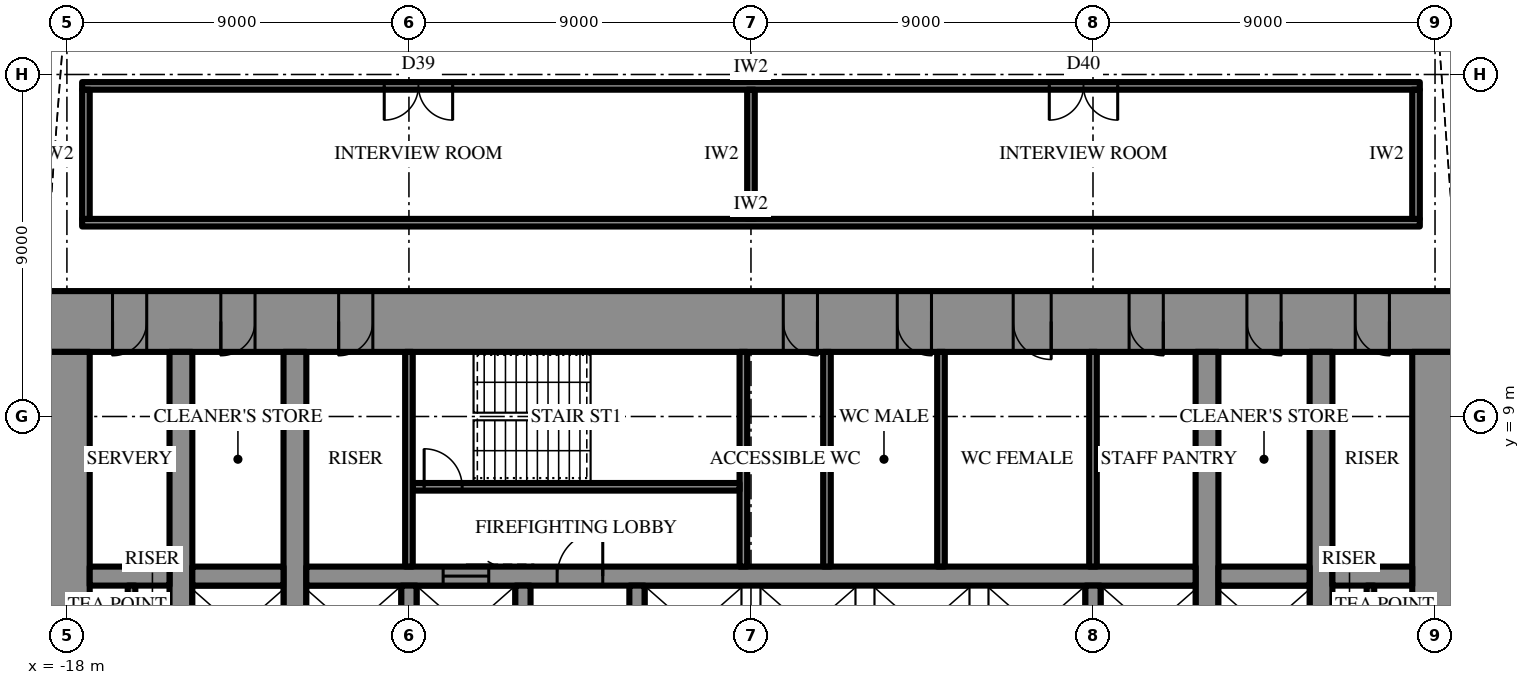
"""IFC4 building model, lengths in metres.
Left out: names, types, materials, properties, quantities, classifications, styles, units other than length and angle.
Written with IfcOpenShell. Run it as: python <this file> out.ifc"""

import sys

from ifc_helpers import new_model, si_unit, direction, frame, frame_2d, origin, place, context, subcontext, project, spatial, rectangle, extrude, element, fill, save


model = new_model("IFC4")
c1 = context("Model", 3, precision=1e-05, world=origin(), true_north=direction((0.0, 1.0)))
c2 = subcontext(c1, "Body", "Model", "MODEL_VIEW")
j1 = project(units=[si_unit("LENGTHUNIT", "METRE"), si_unit("PLANEANGLEUNIT", "RADIAN")], contexts=[c1])
p1 = place(None, origin())
s1 = spatial("IfcSite", under=j1, at=p1, CompositionType="ELEMENT")
p2 = place(p1, origin())
s2 = spatial("IfcBuilding", under=s1, at=p2, CompositionType="ELEMENT")
p3 = place(p2, frame((0.0, 0.0, 165.7)))
s3 = spatial("IfcBuildingStorey", under=s2, at=p3, CompositionType="ELEMENT", Elevation=165.7)
p4 = place(p3, frame((-18.6, 11.5, 0.0), z_axis=(0.0, 0.0, 1.0), x_axis=(1.0, 0.0, 0.0)))
e1 = element("IfcWall", 1, at=p4, inside=s3, PredefinedType="SHEAR", context=c2, shape_type="SweptSolid", body=[
    extrude(rectangle(XDim=37.2, YDim=1.6, at=frame_2d((18.6, 0.0))), origin(), (0.0, 0.0, 1.0), 4.2),
])
p5 = place(p4, frame((19.45, 0.0, 0.0)))
e2 = element("IfcOpeningElement", 2, at=p5, cuts=e1, PredefinedType="OPENING", context=c2, shape_type="SweptSolid", body=[
    extrude(rectangle(XDim=0.9, YDim=2.2, at=frame_2d((0.45, 1.1))), frame((0.0, 0.81, 0.0), z_axis=(0.0, -1.0, 0.0), x_axis=(1.0, 0.0, 0.0)), (0.0, 0.0, 1.0), 1.62),
])
p6 = place(p4, frame((22.45, 0.0, 0.0)))
e3 = element("IfcOpeningElement", 3, at=p6, cuts=e1, PredefinedType="OPENING", context=c2, shape_type="SweptSolid", body=[
    extrude(rectangle(XDim=0.9, YDim=2.2, at=frame_2d((0.45, 1.1))), frame((0.0, 0.81, 0.0), z_axis=(0.0, -1.0, 0.0), x_axis=(1.0, 0.0, 0.0)), (0.0, 0.0, 1.0), 1.62),
])
p7 = place(p4, frame((25.5, 0.0, 0.0)))
e4 = element("IfcOpeningElement", 4, at=p7, cuts=e1, PredefinedType="OPENING", context=c2, shape_type="SweptSolid", body=[
    extrude(rectangle(XDim=1.0, YDim=2.2, at=frame_2d((0.5, 1.1))), frame((0.0, 0.81, 0.0), z_axis=(0.0, -1.0, 0.0), x_axis=(1.0, 0.0, 0.0)), (0.0, 0.0, 1.0), 1.62),
])
p8 = place(p4, frame((1.8, 0.0, 0.0)))
e5 = element("IfcOpeningElement", 5, at=p8, cuts=e1, PredefinedType="OPENING", context=c2, shape_type="SweptSolid", body=[
    extrude(rectangle(XDim=0.9, YDim=2.2, at=frame_2d((0.45, 1.1))), frame((0.0, 0.81, 0.0), z_axis=(0.0, -1.0, 0.0), x_axis=(1.0, 0.0, 0.0)), (0.0, 0.0, 1.0), 1.62),
])
p9 = place(p4, frame((4.65, 0.0, 0.0)))
e6 = element("IfcOpeningElement", 6, at=p9, cuts=e1, PredefinedType="OPENING", context=c2, shape_type="SweptSolid", body=[
    extrude(rectangle(XDim=0.9, YDim=2.2, at=frame_2d((0.45, 1.1))), frame((0.0, 0.81, 0.0), z_axis=(0.0, -1.0, 0.0), x_axis=(1.0, 0.0, 0.0)), (0.0, 0.0, 1.0), 1.62),
])
p10 = place(p4, frame((7.75, 0.0, 0.0)))
e7 = element("IfcOpeningElement", 7, at=p10, cuts=e1, PredefinedType="OPENING", context=c2, shape_type="SweptSolid", body=[
    extrude(rectangle(XDim=0.9, YDim=2.2, at=frame_2d((0.45, 1.1))), frame((0.0, 0.81, 0.0), z_axis=(0.0, -1.0, 0.0), x_axis=(1.0, 0.0, 0.0)), (0.0, 0.0, 1.0), 1.62),
])
p11 = place(p4, frame((28.55, 0.0, 0.0)))
e8 = element("IfcOpeningElement", 8, at=p11, cuts=e1, PredefinedType="OPENING", context=c2, shape_type="SweptSolid", body=[
    extrude(rectangle(XDim=0.9, YDim=2.2, at=frame_2d((0.45, 1.1))), frame((0.0, 0.81, 0.0), z_axis=(0.0, -1.0, 0.0), x_axis=(1.0, 0.0, 0.0)), (0.0, 0.0, 1.0), 1.62),
])
p12 = place(p4, frame((31.65, 0.0, 0.0)))
e9 = element("IfcOpeningElement", 9, at=p12, cuts=e1, PredefinedType="OPENING", context=c2, shape_type="SweptSolid", body=[
    extrude(rectangle(XDim=0.9, YDim=2.2, at=frame_2d((0.45, 1.1))), frame((0.0, 0.81, 0.0), z_axis=(0.0, -1.0, 0.0), x_axis=(1.0, 0.0, 0.0)), (0.0, 0.0, 1.0), 1.62),
])
p13 = place(p4, frame((34.5, 0.0, 0.0)))
e10 = element("IfcOpeningElement", 10, at=p13, cuts=e1, PredefinedType="OPENING", context=c2, shape_type="SweptSolid", body=[
    extrude(rectangle(XDim=0.9, YDim=2.2, at=frame_2d((0.45, 1.1))), frame((0.0, 0.81, 0.0), z_axis=(0.0, -1.0, 0.0), x_axis=(1.0, 0.0, 0.0)), (0.0, 0.0, 1.0), 1.62),
])
p14 = place(p3, frame((18.0, -10.7, 0.0), z_axis=(0.0, 0.0, 1.0), x_axis=(0.0, 1.0, 0.0)))
e11 = element("IfcWall", 11, at=p14, inside=s3, PredefinedType="SHEAR", context=c2, shape_type="SweptSolid", body=[
    extrude(rectangle(XDim=21.4, YDim=1.2, at=frame_2d((10.7, 0.0))), origin(), (0.0, 0.0, 1.0), 4.2),
])
p15 = place(p14, frame((9.8, 0.0, 0.0)))
e12 = element("IfcOpeningElement", 12, at=p15, cuts=e11, PredefinedType="OPENING", context=c2, shape_type="SweptSolid", body=[
    extrude(rectangle(XDim=1.8, YDim=2.4, at=frame_2d((0.9, 1.2))), frame((0.0, 0.61, 0.0), z_axis=(0.0, -1.0, 0.0), x_axis=(1.0, 0.0, 0.0)), (0.0, 0.0, 1.0), 1.22),
])
p16 = place(p3, frame((-18.0, 10.7, 0.0), z_axis=(0.0, 0.0, 1.0), x_axis=(0.0, -1.0, 0.0)))
e13 = element("IfcWall", 13, at=p16, inside=s3, PredefinedType="SHEAR", context=c2, shape_type="SweptSolid", body=[
    extrude(rectangle(XDim=21.4, YDim=1.2, at=frame_2d((10.7, 0.0))), origin(), (0.0, 0.0, 1.0), 4.2),
])
p17 = place(p16, frame((9.8, 0.0, 0.0)))
e14 = element("IfcOpeningElement", 14, at=p17, cuts=e13, PredefinedType="OPENING", context=c2, shape_type="SweptSolid", body=[
    extrude(rectangle(XDim=1.8, YDim=2.4, at=frame_2d((0.9, 1.2))), frame((0.0, 0.61, 0.0), z_axis=(0.0, -1.0, 0.0), x_axis=(1.0, 0.0, 0.0)), (0.0, 0.0, 1.0), 1.22),
])
p18 = place(p3, frame((12.0, -10.7, 0.0), z_axis=(0.0, 0.0, 1.0), x_axis=(0.0, 1.0, 0.0)))
e15 = element("IfcWall", 15, at=p18, inside=s3, PredefinedType="SHEAR", context=c2, shape_type="SweptSolid", body=[
    extrude(rectangle(XDim=21.4, YDim=0.6, at=frame_2d((10.7, 0.0))), origin(), (0.0, 0.0, 1.0), 4.2),
])
p19 = place(p18, frame((9.8, 0.0, 0.0)))
e16 = element("IfcOpeningElement", 16, at=p19, cuts=e15, PredefinedType="OPENING", context=c2, shape_type="SweptSolid", body=[
    extrude(rectangle(XDim=1.8, YDim=2.4, at=frame_2d((0.9, 1.2))), frame((0.0, 0.31, 0.0), z_axis=(0.0, -1.0, 0.0), x_axis=(1.0, 0.0, 0.0)), (0.0, 0.0, 1.0), 0.62),
])
p20 = place(p3, frame((-12.0, -10.7, 0.0), z_axis=(0.0, 0.0, 1.0), x_axis=(0.0, 1.0, 0.0)))
e17 = element("IfcWall", 17, at=p20, inside=s3, PredefinedType="SHEAR", context=c2, shape_type="SweptSolid", body=[
    extrude(rectangle(XDim=21.4, YDim=0.6, at=frame_2d((10.7, 0.0))), origin(), (0.0, 0.0, 1.0), 4.2),
])
p21 = place(p20, frame((9.8, 0.0, 0.0)))
e18 = element("IfcOpeningElement", 18, at=p21, cuts=e17, PredefinedType="OPENING", context=c2, shape_type="SweptSolid", body=[
    extrude(rectangle(XDim=1.8, YDim=2.4, at=frame_2d((0.9, 1.2))), frame((0.0, 0.31, 0.0), z_axis=(0.0, -1.0, 0.0), x_axis=(1.0, 0.0, 0.0)), (0.0, 0.0, 1.0), 0.62),
])
p22 = place(p3, frame((15.0, -10.7, 0.0), z_axis=(0.0, 0.0, 1.0), x_axis=(0.0, 1.0, 0.0)))
e19 = element("IfcWall", 19, at=p22, inside=s3, PredefinedType="SHEAR", context=c2, shape_type="SweptSolid", body=[
    extrude(rectangle(XDim=21.4, YDim=0.6, at=frame_2d((10.7, 0.0))), origin(), (0.0, 0.0, 1.0), 4.2),
])
p23 = place(p22, frame((9.8, 0.0, 0.0)))
e20 = element("IfcOpeningElement", 20, at=p23, cuts=e19, PredefinedType="OPENING", context=c2, shape_type="SweptSolid", body=[
    extrude(rectangle(XDim=1.8, YDim=2.4, at=frame_2d((0.9, 1.2))), frame((0.0, 0.31, 0.0), z_axis=(0.0, -1.0, 0.0), x_axis=(1.0, 0.0, 0.0)), (0.0, 0.0, 1.0), 0.62),
])
p24 = place(p3, frame((-15.0, -10.7, 0.0), z_axis=(0.0, 0.0, 1.0), x_axis=(0.0, 1.0, 0.0)))
e21 = element("IfcWall", 21, at=p24, inside=s3, PredefinedType="SHEAR", context=c2, shape_type="SweptSolid", body=[
    extrude(rectangle(XDim=21.4, YDim=0.6, at=frame_2d((10.7, 0.0))), origin(), (0.0, 0.0, 1.0), 4.2),
])
p25 = place(p24, frame((9.8, 0.0, 0.0)))
e22 = element("IfcOpeningElement", 22, at=p25, cuts=e21, PredefinedType="OPENING", context=c2, shape_type="SweptSolid", body=[
    extrude(rectangle(XDim=1.8, YDim=2.4, at=frame_2d((0.9, 1.2))), frame((0.0, 0.31, 0.0), z_axis=(0.0, -1.0, 0.0), x_axis=(1.0, 0.0, 0.0)), (0.0, 0.0, 1.0), 0.62),
])
p26 = place(p3, frame((-17.4, 4.8, 0.0), z_axis=(0.0, 0.0, 1.0), x_axis=(1.0, 0.0, 0.0)))
e23 = element("IfcWall", 23, at=p26, inside=s3, PredefinedType="SHEAR", context=c2, shape_type="SweptSolid", body=[
    extrude(rectangle(XDim=2.1, YDim=0.5, at=frame_2d((1.05, 0.0))), origin(), (0.0, 0.0, 1.0), 4.2),
])
p27 = place(p3, frame((-14.7, 4.8, 0.0), z_axis=(0.0, 0.0, 1.0), x_axis=(1.0, 0.0, 0.0)))
e24 = element("IfcWall", 24, at=p27, inside=s3, PredefinedType="SHEAR", context=c2, shape_type="SweptSolid", body=[
    extrude(rectangle(XDim=2.4, YDim=0.5, at=frame_2d((1.2, 0.0))), origin(), (0.0, 0.0, 1.0), 4.2),
])
p28 = place(p3, frame((-11.7, 4.8, 0.0), z_axis=(0.0, 0.0, 1.0), x_axis=(1.0, 0.0, 0.0)))
e25 = element("IfcWall", 25, at=p28, inside=s3, PredefinedType="SHEAR", context=c2, shape_type="SweptSolid", body=[
    extrude(rectangle(XDim=23.4, YDim=0.5, at=frame_2d((11.7, 0.0))), origin(), (0.0, 0.0, 1.0), 4.2),
])
p29 = place(p28, frame((6.6, 0.0, 0.0)))
e26 = element("IfcOpeningElement", 26, at=p29, cuts=e25, PredefinedType="OPENING", context=c2, shape_type="SweptSolid", body=[
    extrude(rectangle(XDim=1.2, YDim=2.2, at=frame_2d((0.6, 1.1))), frame((0.0, 0.26, 0.0), z_axis=(0.0, -1.0, 0.0), x_axis=(1.0, 0.0, 0.0)), (0.0, 0.0, 1.0), 0.52),
])
p30 = place(p28, frame((3.6, 0.0, 0.0)))
e27 = element("IfcOpeningElement", 27, at=p30, cuts=e25, PredefinedType="OPENING", context=c2, shape_type="SweptSolid", body=[
    extrude(rectangle(XDim=1.2, YDim=2.2, at=frame_2d((0.6, 1.1))), frame((0.0, 0.26, 0.0), z_axis=(0.0, -1.0, 0.0), x_axis=(1.0, 0.0, 0.0)), (0.0, 0.0, 1.0), 0.52),
])
p31 = place(p3, frame((12.3, 4.8, 0.0), z_axis=(0.0, 0.0, 1.0), x_axis=(1.0, 0.0, 0.0)))
e28 = element("IfcWall", 28, at=p31, inside=s3, PredefinedType="SHEAR", context=c2, shape_type="SweptSolid", body=[
    extrude(rectangle(XDim=2.4, YDim=0.5, at=frame_2d((1.2, 0.0))), origin(), (0.0, 0.0, 1.0), 4.2),
])
p32 = place(p3, frame((15.3, 4.8, 0.0), z_axis=(0.0, 0.0, 1.0), x_axis=(1.0, 0.0, 0.0)))
e29 = element("IfcWall", 29, at=p32, inside=s3, PredefinedType="SHEAR", context=c2, shape_type="SweptSolid", body=[
    extrude(rectangle(XDim=2.1, YDim=0.5, at=frame_2d((1.05, 0.0))), origin(), (0.0, 0.0, 1.0), 4.2),
])
for number, where, z_axis, x_axis in (
    (30, (-9.0, 2.25, 0.0), (0.0, 0.0, 1.0), (0.0, 1.0, 0.0)),
    (31, (-6.0, 2.25, 0.0), (0.0, 0.0, 1.0), (0.0, 1.0, 0.0)),
    (32, (-3.0, 2.25, 0.0), (0.0, 0.0, 1.0), (0.0, 1.0, 0.0)),
    (33, (9.0, 2.25, 0.0), (0.0, 0.0, 1.0), (0.0, 1.0, 0.0)),
):
    element("IfcWall", number, at=place(p3, frame(where, z_axis=z_axis, x_axis=x_axis)), inside=s3, PredefinedType="SHEAR", context=c2, shape_type="SweptSolid", body=[
        extrude(rectangle(XDim=2.3, YDim=0.4, at=frame_2d((1.15, 0.0))), origin(), (0.0, 0.0, 1.0), 4.2),
    ])
p33 = place(p3, frame((-0.2, 5.05, 0.0), z_axis=(0.0, 0.0, 1.0), x_axis=(0.0, 1.0, 0.0)))
e34 = element("IfcWall", 34, at=p33, inside=s3, PredefinedType="SHEAR", context=c2, shape_type="SweptSolid", body=[
    extrude(rectangle(XDim=5.65, YDim=0.2, at=frame_2d((2.825, 0.0))), origin(), (0.0, 0.0, 1.0), 4.2),
])
p34 = place(p3, frame((-8.9, 7.15, 0.0), z_axis=(0.0, 0.0, 1.0), x_axis=(1.0, 0.0, 0.0)))
e35 = element("IfcWall", 35, at=p34, inside=s3, PredefinedType="SHEAR", context=c2, shape_type="SweptSolid", body=[
    extrude(rectangle(XDim=8.6, YDim=0.2, at=frame_2d((4.3, 0.0))), origin(), (0.0, 0.0, 1.0), 4.2),
])
p35 = place(p34, frame((0.3, 0.0, 0.0)))
e36 = element("IfcOpeningElement", 36, at=p35, cuts=e35, PredefinedType="OPENING", context=c2, shape_type="SweptSolid", body=[
    extrude(rectangle(XDim=1.0, YDim=2.2, at=frame_2d((0.5, 1.1))), frame((0.0, 0.11, 0.0), z_axis=(0.0, -1.0, 0.0), x_axis=(1.0, 0.0, 0.0)), (0.0, 0.0, 1.0), 0.22),
])
for number, where, z_axis, x_axis in (
    (37, (-9.0, 5.05, 0.0), (0.0, 0.0, 1.0), (0.0, 1.0, 0.0)),
    (38, (9.0, 5.05, 0.0), (0.0, 0.0, 1.0), (0.0, 1.0, 0.0)),
    (39, (2.0, 5.05, 0.0), (0.0, 0.0, 1.0), (0.0, 1.0, 0.0)),
    (40, (5.0, 5.05, 0.0), (0.0, 0.0, 1.0), (0.0, 1.0, 0.0)),
):
    element("IfcWall", number, at=place(p3, frame(where, z_axis=z_axis, x_axis=x_axis)), inside=s3, PredefinedType="PARTITIONING", context=c2, shape_type="SweptSolid", body=[
        extrude(rectangle(XDim=5.65, YDim=0.2, at=frame_2d((2.825, 0.0))), origin(), (0.0, 0.0, 1.0), 4.0),
    ])
for number, where, z_axis, x_axis in (
    (41, (-16.3, 3.55, 0.0), (0.0, 0.0, 1.0), (0.0, 1.0, 0.0)),
    (42, (16.3, 3.55, 0.0), (0.0, 0.0, 1.0), (0.0, 1.0, 0.0)),
):
    element("IfcWall", number, at=place(p3, frame(where, z_axis=z_axis, x_axis=x_axis)), inside=s3, PredefinedType="PARTITIONING", context=c2, shape_type="SweptSolid", body=[
        extrude(rectangle(XDim=1.0, YDim=0.2, at=frame_2d((0.5, 0.0))), origin(), (0.0, 0.0, 1.0), 4.0),
    ])
p36 = place(p3, frame((-17.6, 14.1, 0.0), z_axis=(0.0, 0.0, 1.0), x_axis=(1.0, 0.0, 0.0)))
e43 = element("IfcWall", 43, at=p36, inside=s3, PredefinedType="PARTITIONING", context=c2, shape_type="SweptSolid", body=[
    extrude(rectangle(XDim=35.2, YDim=0.2, at=frame_2d((17.6, 0.0))), origin(), (0.0, 0.0, 1.0), 4.0),
])
p37 = place(p3, frame((-17.6, 17.7, 0.0), z_axis=(0.0, 0.0, 1.0), x_axis=(1.0, 0.0, 0.0)))
e44 = element("IfcWall", 44, at=p37, inside=s3, PredefinedType="PARTITIONING", context=c2, shape_type="SweptSolid", body=[
    extrude(rectangle(XDim=35.2, YDim=0.2, at=frame_2d((17.6, 0.0))), origin(), (0.0, 0.0, 1.0), 4.0),
])
p38 = place(p37, frame((7.95, 0.0, 0.0)))
e45 = element("IfcOpeningElement", 45, at=p38, cuts=e44, PredefinedType="OPENING", context=c2, shape_type="SweptSolid", body=[
    extrude(rectangle(XDim=1.8, YDim=2.4, at=frame_2d((0.9, 1.2))), frame((0.0, 0.11, 0.0), z_axis=(0.0, -1.0, 0.0), x_axis=(1.0, 0.0, 0.0)), (0.0, 0.0, 1.0), 0.22),
])
p39 = place(p37, frame((25.45, 0.0, 0.0)))
e46 = element("IfcOpeningElement", 46, at=p39, cuts=e44, PredefinedType="OPENING", context=c2, shape_type="SweptSolid", body=[
    extrude(rectangle(XDim=1.8, YDim=2.4, at=frame_2d((0.9, 1.2))), frame((0.0, 0.11, 0.0), z_axis=(0.0, -1.0, 0.0), x_axis=(1.0, 0.0, 0.0)), (0.0, 0.0, 1.0), 0.22),
])
p40 = place(p3, frame((-17.5, 14.2, 0.0), z_axis=(0.0, 0.0, 1.0), x_axis=(0.0, 1.0, 0.0)))
e47 = element("IfcWall", 47, at=p40, inside=s3, PredefinedType="PARTITIONING", context=c2, shape_type="SweptSolid", body=[
    extrude(rectangle(XDim=3.4, YDim=0.2, at=frame_2d((1.7, 0.0))), origin(), (0.0, 0.0, 1.0), 4.0),
])
p41 = place(p3, frame((0.0, 14.2, 0.0), z_axis=(0.0, 0.0, 1.0), x_axis=(0.0, 1.0, 0.0)))
e48 = element("IfcWall", 48, at=p41, inside=s3, PredefinedType="PARTITIONING", context=c2, shape_type="SweptSolid", body=[
    extrude(rectangle(XDim=3.4, YDim=0.2, at=frame_2d((1.7, 0.0))), origin(), (0.0, 0.0, 1.0), 2.992),
])
p42 = place(p3, frame((17.5, 14.2, 0.0), z_axis=(0.0, 0.0, 1.0), x_axis=(0.0, 1.0, 0.0)))
e49 = element("IfcWall", 49, at=p42, inside=s3, PredefinedType="PARTITIONING", context=c2, shape_type="SweptSolid", body=[
    extrude(rectangle(XDim=3.4, YDim=0.2, at=frame_2d((1.7, 0.0))), origin(), (0.0, 0.0, 1.0), 4.0),
])
p43 = place(p29, origin())
e50 = element("IfcDoor", 50, at=p43, inside=s3, OperationType="SINGLE_SWING_LEFT", PredefinedType="DOOR", context=c2, shape_type="SweptSolid", body=[
    extrude(rectangle(XDim=1.2, YDim=2.2, at=frame_2d((0.6, 1.1))), frame((0.0, 0.025, 0.0), z_axis=(0.0, -1.0, 0.0), x_axis=(1.0, 0.0, 0.0)), (0.0, 0.0, 1.0), 0.05),
])
fill(e26, e50)
p44 = place(p35, origin())
e51 = element("IfcDoor", 51, at=p44, inside=s3, OperationType="SINGLE_SWING_RIGHT", PredefinedType="DOOR", context=c2, shape_type="SweptSolid", body=[
    extrude(rectangle(XDim=1.0, YDim=2.2, at=frame_2d((0.5, 1.1))), frame((0.0, 0.025, 0.0), z_axis=(0.0, -1.0, 0.0), x_axis=(1.0, 0.0, 0.0)), (0.0, 0.0, 1.0), 0.05),
])
fill(e36, e51)
p45 = place(p5, frame((0.9, 0.0, 0.0), z_axis=(0.0, 0.0, 1.0), x_axis=(-1.0, 0.0, 0.0)))
e52 = element("IfcDoor", 52, at=p45, inside=s3, OperationType="SINGLE_SWING_RIGHT", PredefinedType="DOOR", context=c2, shape_type="SweptSolid", body=[
    extrude(rectangle(XDim=0.9, YDim=2.2, at=frame_2d((0.45, 1.1))), frame((0.0, 0.025, 0.0), z_axis=(0.0, -1.0, 0.0), x_axis=(1.0, 0.0, 0.0)), (0.0, 0.0, 1.0), 0.05),
])
fill(e2, e52)
p46 = place(p6, frame((0.9, 0.0, 0.0), z_axis=(0.0, 0.0, 1.0), x_axis=(-1.0, 0.0, 0.0)))
e53 = element("IfcDoor", 53, at=p46, inside=s3, OperationType="SINGLE_SWING_RIGHT", PredefinedType="DOOR", context=c2, shape_type="SweptSolid", body=[
    extrude(rectangle(XDim=0.9, YDim=2.2, at=frame_2d((0.45, 1.1))), frame((0.0, 0.025, 0.0), z_axis=(0.0, -1.0, 0.0), x_axis=(1.0, 0.0, 0.0)), (0.0, 0.0, 1.0), 0.05),
])
fill(e3, e53)
p47 = place(p7, frame((1.0, 0.0, 0.0), z_axis=(0.0, 0.0, 1.0), x_axis=(-1.0, 0.0, 0.0)))
e54 = element("IfcDoor", 54, at=p47, inside=s3, OperationType="SINGLE_SWING_RIGHT", PredefinedType="DOOR", context=c2, shape_type="SweptSolid", body=[
    extrude(rectangle(XDim=1.0, YDim=2.2, at=frame_2d((0.5, 1.1))), frame((0.0, 0.025, 0.0), z_axis=(0.0, -1.0, 0.0), x_axis=(1.0, 0.0, 0.0)), (0.0, 0.0, 1.0), 0.05),
])
fill(e4, e54)
p48 = place(p8, frame((0.9, 0.0, 0.0), z_axis=(0.0, 0.0, 1.0), x_axis=(-1.0, 0.0, 0.0)))
e55 = element("IfcDoor", 55, at=p48, inside=s3, OperationType="SINGLE_SWING_LEFT", PredefinedType="DOOR", context=c2, shape_type="SweptSolid", body=[
    extrude(rectangle(XDim=0.9, YDim=2.2, at=frame_2d((0.45, 1.1))), frame((0.0, 0.025, 0.0), z_axis=(0.0, -1.0, 0.0), x_axis=(1.0, 0.0, 0.0)), (0.0, 0.0, 1.0), 0.05),
])
fill(e5, e55)
p49 = place(p9, frame((0.9, 0.0, 0.0), z_axis=(0.0, 0.0, 1.0), x_axis=(-1.0, 0.0, 0.0)))
e56 = element("IfcDoor", 56, at=p49, inside=s3, OperationType="SINGLE_SWING_LEFT", PredefinedType="DOOR", context=c2, shape_type="SweptSolid", body=[
    extrude(rectangle(XDim=0.9, YDim=2.2, at=frame_2d((0.45, 1.1))), frame((0.0, 0.025, 0.0), z_axis=(0.0, -1.0, 0.0), x_axis=(1.0, 0.0, 0.0)), (0.0, 0.0, 1.0), 0.05),
])
fill(e6, e56)
p50 = place(p10, frame((0.9, 0.0, 0.0), z_axis=(0.0, 0.0, 1.0), x_axis=(-1.0, 0.0, 0.0)))
e57 = element("IfcDoor", 57, at=p50, inside=s3, OperationType="SINGLE_SWING_LEFT", PredefinedType="DOOR", context=c2, shape_type="SweptSolid", body=[
    extrude(rectangle(XDim=0.9, YDim=2.2, at=frame_2d((0.45, 1.1))), frame((0.0, 0.025, 0.0), z_axis=(0.0, -1.0, 0.0), x_axis=(1.0, 0.0, 0.0)), (0.0, 0.0, 1.0), 0.05),
])
fill(e7, e57)
p51 = place(p11, frame((0.9, 0.0, 0.0), z_axis=(0.0, 0.0, 1.0), x_axis=(-1.0, 0.0, 0.0)))
e58 = element("IfcDoor", 58, at=p51, inside=s3, OperationType="SINGLE_SWING_RIGHT", PredefinedType="DOOR", context=c2, shape_type="SweptSolid", body=[
    extrude(rectangle(XDim=0.9, YDim=2.2, at=frame_2d((0.45, 1.1))), frame((0.0, 0.025, 0.0), z_axis=(0.0, -1.0, 0.0), x_axis=(1.0, 0.0, 0.0)), (0.0, 0.0, 1.0), 0.05),
])
fill(e8, e58)
p52 = place(p12, frame((0.9, 0.0, 0.0), z_axis=(0.0, 0.0, 1.0), x_axis=(-1.0, 0.0, 0.0)))
e59 = element("IfcDoor", 59, at=p52, inside=s3, OperationType="SINGLE_SWING_RIGHT", PredefinedType="DOOR", context=c2, shape_type="SweptSolid", body=[
    extrude(rectangle(XDim=0.9, YDim=2.2, at=frame_2d((0.45, 1.1))), frame((0.0, 0.025, 0.0), z_axis=(0.0, -1.0, 0.0), x_axis=(1.0, 0.0, 0.0)), (0.0, 0.0, 1.0), 0.05),
])
fill(e9, e59)
p53 = place(p13, frame((0.9, 0.0, 0.0), z_axis=(0.0, 0.0, 1.0), x_axis=(-1.0, 0.0, 0.0)))
e60 = element("IfcDoor", 60, at=p53, inside=s3, OperationType="SINGLE_SWING_RIGHT", PredefinedType="DOOR", context=c2, shape_type="SweptSolid", body=[
    extrude(rectangle(XDim=0.9, YDim=2.2, at=frame_2d((0.45, 1.1))), frame((0.0, 0.025, 0.0), z_axis=(0.0, -1.0, 0.0), x_axis=(1.0, 0.0, 0.0)), (0.0, 0.0, 1.0), 0.05),
])
fill(e10, e60)
p54 = place(p30, origin())
e61 = element("IfcDoor", 61, at=p54, inside=s3, OperationType="SLIDING_TO_LEFT", PredefinedType="DOOR", context=c2, shape_type="SweptSolid", body=[
    extrude(rectangle(XDim=1.2, YDim=2.2, at=frame_2d((0.6, 1.1))), frame((0.0, 0.025, 0.0), z_axis=(0.0, -1.0, 0.0), x_axis=(1.0, 0.0, 0.0)), (0.0, 0.0, 1.0), 0.05),
])
fill(e27, e61)
p55 = place(p38, frame((1.8, 0.0, 0.0), z_axis=(0.0, 0.0, 1.0), x_axis=(-1.0, 0.0, 0.0)))
e62 = element("IfcDoor", 62, at=p55, inside=s3, OperationType="DOUBLE_DOOR_SINGLE_SWING", PredefinedType="DOOR", context=c2, shape_type="SweptSolid", body=[
    extrude(rectangle(XDim=1.8, YDim=2.4, at=frame_2d((0.9, 1.2))), frame((0.0, 0.025, 0.0), z_axis=(0.0, -1.0, 0.0), x_axis=(1.0, 0.0, 0.0)), (0.0, 0.0, 1.0), 0.05),
])
fill(e45, e62)
p56 = place(p39, frame((1.8, 0.0, 0.0), z_axis=(0.0, 0.0, 1.0), x_axis=(-1.0, 0.0, 0.0)))
e63 = element("IfcDoor", 63, at=p56, inside=s3, OperationType="DOUBLE_DOOR_SINGLE_SWING", PredefinedType="DOOR", context=c2, shape_type="SweptSolid", body=[
    extrude(rectangle(XDim=1.8, YDim=2.4, at=frame_2d((0.9, 1.2))), frame((0.0, 0.025, 0.0), z_axis=(0.0, -1.0, 0.0), x_axis=(1.0, 0.0, 0.0)), (0.0, 0.0, 1.0), 0.05),
])
fill(e46, e63)
save(model, sys.argv[1])
